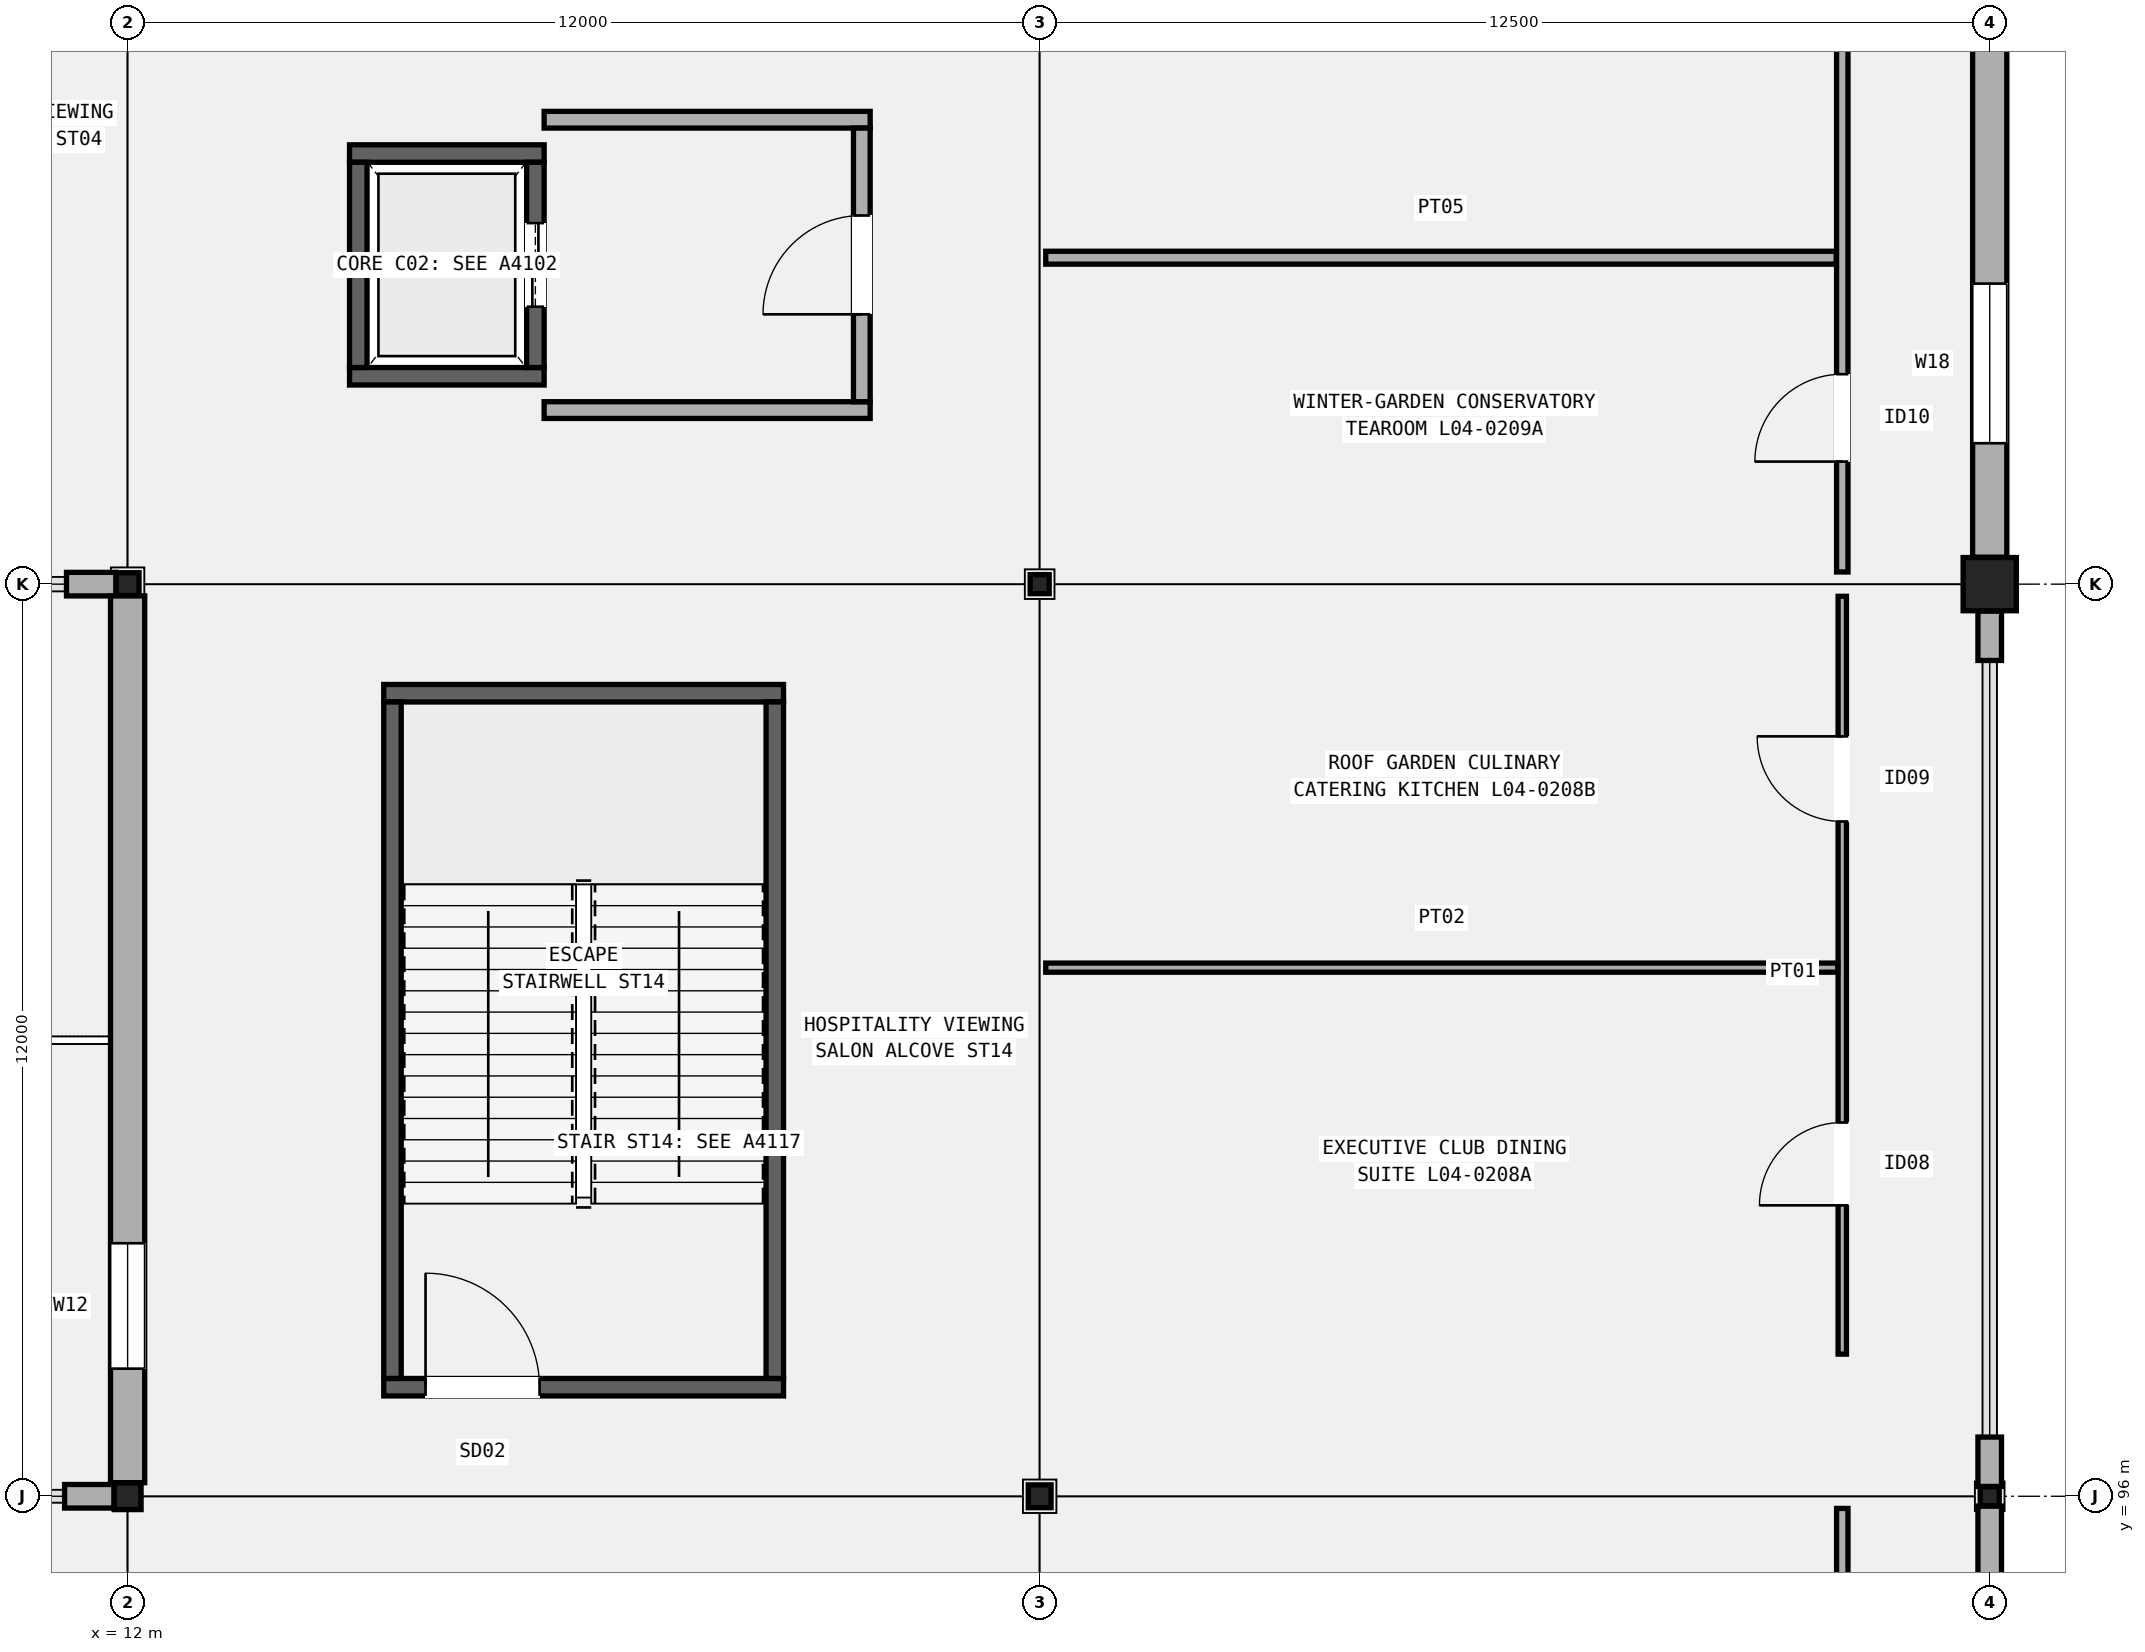
"""IFC4 building model, lengths in metres.
Left out: names, types, materials, properties, quantities, classifications, styles, units other than length and angle.
Written with IfcOpenShell. Run it as: python <this file> out.ifc"""

import sys

from ifc_helpers import new_model, si_unit, direction, frame, frame_2d, origin, origin_2d, place, context, subcontext, project, spatial, rectangle, hollow_rectangle, extrude, element, fill, save


model = new_model("IFC4")
c1 = context("Model", 3, precision=1e-05, world=origin(), true_north=direction((0.0, 1.0)))
c2 = subcontext(c1, "Body", "Model", "MODEL_VIEW")
j1 = project(units=[si_unit("LENGTHUNIT", "METRE"), si_unit("PLANEANGLEUNIT", "RADIAN")], contexts=[c1])
p1 = place(None, origin())
s1 = spatial("IfcSite", under=j1, at=p1, CompositionType="ELEMENT")
p2 = place(p1, origin())
s2 = spatial("IfcBuilding", under=s1, at=p2, CompositionType="ELEMENT")
p3 = place(p2, frame((0.0, 0.0, 20.4)))
s3 = spatial("IfcBuildingStorey", under=s2, at=p3, CompositionType="ELEMENT", Elevation=20.4)
p4 = place(p3, frame((12.0, 96.0, 0.0), z_axis=(0.0, 0.0, 1.0), x_axis=(1.0, 0.0, 0.0)))
e1 = element("IfcColumn", 1, at=p4, inside=s3, PredefinedType="COLUMN", context=c2, shape_type="SweptSolid", body=[
    extrude(hollow_rectangle(XDim=0.35, YDim=0.35, WallThickness=0.016, InnerFilletRadius=0.016, OuterFilletRadius=0.032, at=origin_2d()), origin(), (0.0, 0.0, 1.0), 5.4),
])
for number, where, z_axis, x_axis in (
    (2, (12.0, 108.0, 0.0), (0.0, 0.0, 1.0), (1.0, 0.0, 0.0)),
    (3, (24.0, 96.0, 0.0), (0.0, 0.0, 1.0), (1.0, 0.0, 0.0)),
):
    element("IfcColumn", number, at=place(p3, frame(where, z_axis=z_axis, x_axis=x_axis)), inside=s3, PredefinedType="COLUMN", context=c2, shape_type="SweptSolid", body=[
        extrude(hollow_rectangle(XDim=0.3, YDim=0.3, WallThickness=0.012, InnerFilletRadius=0.012, OuterFilletRadius=0.024, at=origin_2d()), origin(), (0.0, 0.0, 1.0), 5.4),
    ])
for number, where, z_axis, x_axis in (
    (4, (24.0, 108.0, 0.0), (0.0, 0.0, 1.0), (1.0, 0.0, 0.0)),
    (5, (36.5, 96.0, 0.0), (0.0, 0.0, 1.0), (1.0, 0.0, 0.0)),
):
    element("IfcColumn", number, at=place(p3, frame(where, z_axis=z_axis, x_axis=x_axis)), inside=s3, PredefinedType="COLUMN", context=c2, shape_type="SweptSolid", body=[
        extrude(hollow_rectangle(XDim=0.25, YDim=0.25, WallThickness=0.012, InnerFilletRadius=0.012, OuterFilletRadius=0.024, at=origin_2d()), origin(), (0.0, 0.0, 1.0), 5.4),
    ])
p5 = place(p3, frame((36.5, 108.0, 0.0), z_axis=(0.0, 0.0, 1.0), x_axis=(1.0, 0.0, 0.0)))
e6 = element("IfcColumn", 6, at=p5, inside=s3, PredefinedType="COLUMN", context=c2, shape_type="SweptSolid", body=[
    extrude(rectangle(XDim=0.7, YDim=0.7, at=origin_2d()), origin(), (0.0, 0.0, 1.0), 5.4),
])
p6 = place(p3, frame((11.171, 96.0, 0.0), z_axis=(0.0, 0.0, 1.0), x_axis=(1.0, 0.0, 0.0)))
e7 = element("IfcWall", 7, at=p6, inside=s3, PredefinedType="SOLIDWALL", context=c2, shape_type="SweptSolid", body=[
    extrude(rectangle(XDim=0.65, YDim=0.31, at=frame_2d((0.325, 0.0))), origin(), (0.0, 0.0, 1.0), 4.592),
])
p7 = place(p3, frame((11.196, 108.0, 0.0), z_axis=(0.0, 0.0, 1.0), x_axis=(1.0, 0.0, 0.0)))
e8 = element("IfcWall", 8, at=p7, inside=s3, PredefinedType="SOLIDWALL", context=c2, shape_type="SweptSolid", body=[
    extrude(rectangle(XDim=0.65, YDim=0.31, at=frame_2d((0.325, 0.0))), origin(), (0.0, 0.0, 1.0), 4.48),
])
p8 = place(p3, frame((12.0, 96.179, 0.0), z_axis=(0.0, 0.0, 1.0), x_axis=(0.0, 1.0, 0.0)))
e9 = element("IfcWall", 9, at=p8, inside=s3, PredefinedType="SOLIDWALL", context=c2, shape_type="SweptSolid", body=[
    extrude(rectangle(XDim=11.667, YDim=0.45, at=frame_2d((5.833, 0.0))), origin(), (0.0, 0.0, 1.0), 4.48),
])
p9 = place(p8, frame((1.5, 0.0, 0.95)))
e10 = element("IfcOpeningElement", 10, at=p9, cuts=e9, PredefinedType="OPENING", context=c2, shape_type="SweptSolid", body=[
    extrude(rectangle(XDim=1.65, YDim=2.45, at=frame_2d((0.825, 1.225))), frame((0.0, 0.235, 0.0), z_axis=(0.0, -1.0, 0.0), x_axis=(1.0, 0.0, 0.0)), (0.0, 0.0, 1.0), 0.47),
])
p10 = place(p3, frame((36.5, 84.154, 0.0), z_axis=(0.0, 0.0, 1.0), x_axis=(0.0, 1.0, 0.0)))
e11 = element("IfcWall", 11, at=p10, inside=s3, PredefinedType="SOLIDWALL", context=c2, shape_type="SweptSolid", body=[
    extrude(rectangle(XDim=11.717, YDim=0.31, at=frame_2d((5.858, 0.0))), origin(), (0.0, 0.0, 1.0), 4.58),
])
p11 = place(p10, frame((1.5, 0.0, 0.95)))
e12 = element("IfcOpeningElement", 12, at=p11, cuts=e11, PredefinedType="OPENING", context=c2, shape_type="SweptSolid", body=[
    extrude(rectangle(XDim=1.95, YDim=2.35, at=frame_2d((0.975, 1.175))), frame((0.0, 0.165, 0.0), z_axis=(0.0, -1.0, 0.0), x_axis=(1.0, 0.0, 0.0)), (0.0, 0.0, 1.0), 0.33),
])
p12 = place(p3, frame((36.5, 96.129, 0.0), z_axis=(0.0, 0.0, 1.0), x_axis=(0.0, 1.0, 0.0)))
e13 = element("IfcWall", 13, at=p12, inside=s3, PredefinedType="SOLIDWALL", context=c2, shape_type="SweptSolid", body=[
    extrude(rectangle(XDim=0.65, YDim=0.31, at=frame_2d((0.325, 0.0))), origin(), (0.0, 0.0, 1.0), 4.592),
])
p13 = place(p3, frame((36.5, 106.996, 0.0), z_axis=(0.0, 0.0, 1.0), x_axis=(0.0, 1.0, 0.0)))
e14 = element("IfcWall", 14, at=p13, inside=s3, PredefinedType="SOLIDWALL", context=c2, shape_type="SweptSolid", body=[
    extrude(rectangle(XDim=0.65, YDim=0.31, at=frame_2d((0.325, 0.0))), origin(), (0.0, 0.0, 1.0), 4.592),
])
p14 = place(p3, frame((36.5, 108.354, 0.0), z_axis=(0.0, 0.0, 1.0), x_axis=(0.0, 1.0, 0.0)))
e15 = element("IfcWall", 15, at=p14, inside=s3, PredefinedType="SOLIDWALL", context=c2, shape_type="SweptSolid", body=[
    extrude(rectangle(XDim=11.342, YDim=0.45, at=frame_2d((5.671, 0.0))), origin(), (0.0, 0.0, 1.0), 4.48),
])
p15 = place(p14, frame((1.5, 0.0, 0.95)))
e16 = element("IfcOpeningElement", 16, at=p15, cuts=e15, PredefinedType="OPENING", context=c2, shape_type="SweptSolid", body=[
    extrude(rectangle(XDim=2.1, YDim=1.85, at=frame_2d((1.05, 0.925))), frame((0.0, 0.235, 0.0), z_axis=(0.0, -1.0, 0.0), x_axis=(1.0, 0.0, 0.0)), (0.0, 0.0, 1.0), 0.47),
])
p16 = place(p3, frame((15.37, 97.435, 0.0), z_axis=(0.0, 0.0, 1.0), x_axis=(1.0, 0.0, 0.0)))
e17 = element("IfcWall", 17, at=p16, inside=s3, PredefinedType="SHEAR", context=c2, shape_type="SweptSolid", body=[
    extrude(rectangle(XDim=5.26, YDim=0.23, at=frame_2d((2.63, 0.0))), origin(), (0.0, 0.0, 1.0), 5.18),
])
p17 = place(p16, frame((0.55, 0.0, 0.0)))
e18 = element("IfcOpeningElement", 18, at=p17, cuts=e17, PredefinedType="OPENING", context=c2, shape_type="SweptSolid", body=[
    extrude(rectangle(XDim=1.5, YDim=2.2, at=frame_2d((0.75, 1.1))), frame((0.0, 0.125, 0.0), z_axis=(0.0, -1.0, 0.0), x_axis=(1.0, 0.0, 0.0)), (0.0, 0.0, 1.0), 0.25),
])
p18 = place(p3, frame((15.37, 106.565, 0.0), z_axis=(0.0, 0.0, 1.0), x_axis=(1.0, 0.0, 0.0)))
e19 = element("IfcWall", 19, at=p18, inside=s3, PredefinedType="SHEAR", context=c2, shape_type="SweptSolid", body=[
    extrude(rectangle(XDim=5.26, YDim=0.23, at=frame_2d((2.63, 0.0))), origin(), (0.0, 0.0, 1.0), 5.18),
])
for number, where, z_axis, x_axis in (
    (20, (15.485, 97.55, 0.0), (0.0, 0.0, 1.0), (0.0, 1.0, 0.0)),
    (21, (20.515, 97.55, 0.0), (0.0, 0.0, 1.0), (0.0, 1.0, 0.0)),
):
    element("IfcWall", number, at=place(p3, frame(where, z_axis=z_axis, x_axis=x_axis)), inside=s3, PredefinedType="SHEAR", context=c2, shape_type="SweptSolid", body=[
        extrude(rectangle(XDim=8.9, YDim=0.23, at=frame_2d((4.45, 0.0))), origin(), (0.0, 0.0, 1.0), 5.18),
    ])
for number, where, z_axis, x_axis in (
    (22, (14.92, 110.735, 0.0), (0.0, 0.0, 1.0), (1.0, 0.0, 0.0)),
    (23, (14.92, 113.665, 0.0), (0.0, 0.0, 1.0), (1.0, 0.0, 0.0)),
):
    element("IfcWall", number, at=place(p3, frame(where, z_axis=z_axis, x_axis=x_axis)), inside=s3, PredefinedType="SHEAR", context=c2, shape_type="SweptSolid", body=[
        extrude(rectangle(XDim=2.56, YDim=0.23, at=frame_2d((1.28, 0.0))), origin(), (0.0, 0.0, 1.0), 5.18),
    ])
p19 = place(p3, frame((15.035, 110.85, 0.0), z_axis=(0.0, 0.0, 1.0), x_axis=(0.0, 1.0, 0.0)))
e24 = element("IfcWall", 24, at=p19, inside=s3, PredefinedType="SHEAR", context=c2, shape_type="SweptSolid", body=[
    extrude(rectangle(XDim=2.7, YDim=0.23, at=frame_2d((1.35, 0.0))), origin(), (0.0, 0.0, 1.0), 5.18),
])
p20 = place(p3, frame((17.365, 110.85, 0.0), z_axis=(0.0, 0.0, 1.0), x_axis=(0.0, 1.0, 0.0)))
e25 = element("IfcWall", 25, at=p20, inside=s3, PredefinedType="SHEAR", context=c2, shape_type="SweptSolid", body=[
    extrude(rectangle(XDim=2.7, YDim=0.23, at=frame_2d((1.35, 0.0))), origin(), (0.0, 0.0, 1.0), 5.18),
])
p21 = place(p20, frame((0.8, 0.0, 0.0)))
e26 = element("IfcOpeningElement", 26, at=p21, cuts=e25, PredefinedType="OPENING", context=c2, shape_type="SweptSolid", body=[
    extrude(rectangle(XDim=1.1, YDim=2.15, at=frame_2d((0.55, 1.075))), frame((0.0, 0.125, 0.0), z_axis=(0.0, -1.0, 0.0), x_axis=(1.0, 0.0, 0.0)), (0.0, 0.0, 1.0), 0.25),
])
for number, where, z_axis, x_axis in (
    (27, (17.48, 110.29, 0.0), (0.0, 0.0, 1.0), (1.0, 0.0, 0.0)),
    (28, (17.48, 114.11, 0.0), (0.0, 0.0, 1.0), (1.0, 0.0, 0.0)),
):
    element("IfcWall", number, at=place(p3, frame(where, z_axis=z_axis, x_axis=x_axis)), inside=s3, PredefinedType="SOLIDWALL", context=c2, shape_type="SweptSolid", body=[
        extrude(rectangle(XDim=4.29, YDim=0.22, at=frame_2d((2.145, 0.0))), origin(), (0.0, 0.0, 1.0), 4.52),
    ])
p22 = place(p3, frame((21.66, 110.4, 0.0), z_axis=(0.0, 0.0, 1.0), x_axis=(0.0, 1.0, 0.0)))
e29 = element("IfcWall", 29, at=p22, inside=s3, PredefinedType="SOLIDWALL", context=c2, shape_type="SweptSolid", body=[
    extrude(rectangle(XDim=3.6, YDim=0.22, at=frame_2d((1.8, 0.0))), origin(), (0.0, 0.0, 1.0), 4.52),
])
p23 = place(p22, frame((1.15, 0.0, 0.0)))
e30 = element("IfcOpeningElement", 30, at=p23, cuts=e29, PredefinedType="OPENING", context=c2, shape_type="SweptSolid", body=[
    extrude(rectangle(XDim=1.3, YDim=2.15, at=frame_2d((0.65, 1.075))), frame((0.0, 0.12, 0.0), z_axis=(0.0, -1.0, 0.0), x_axis=(1.0, 0.0, 0.0)), (0.0, 0.0, 1.0), 0.24),
])
p24 = place(p3, frame((34.56, 84.16, 0.0), z_axis=(0.0, 0.0, 1.0), x_axis=(0.0, 1.0, 0.0)))
e31 = element("IfcWall", 31, at=p24, inside=s3, PredefinedType="PARTITIONING", context=c2, shape_type="SweptSolid", body=[
    extrude(rectangle(XDim=11.68, YDim=0.15, at=frame_2d((5.84, 0.0))), origin(), (0.0, 0.0, 1.0), 4.52),
])
p25 = place(p24, frame((5.31, 0.0, 0.0)))
e32 = element("IfcOpeningElement", 32, at=p25, cuts=e31, PredefinedType="OPENING", context=c2, shape_type="SweptSolid", body=[
    extrude(rectangle(XDim=1.06, YDim=2.15, at=frame_2d((0.53, 1.075))), frame((0.0, 0.085, 0.0), z_axis=(0.0, -1.0, 0.0), x_axis=(1.0, 0.0, 0.0)), (0.0, 0.0, 1.0), 0.17),
])
p26 = place(p3, frame((34.56, 97.87, 0.0), z_axis=(0.0, 0.0, 1.0), x_axis=(0.0, 1.0, 0.0)))
e33 = element("IfcWall", 33, at=p26, inside=s3, PredefinedType="PARTITIONING", context=c2, shape_type="SweptSolid", body=[
    extrude(rectangle(XDim=9.97, YDim=0.11, at=frame_2d((4.985, 0.0))), origin(), (0.0, 0.0, 1.0), 4.52),
])
p27 = place(p26, frame((1.958, 0.0, 0.0)))
e34 = element("IfcOpeningElement", 34, at=p27, cuts=e33, PredefinedType="OPENING", context=c2, shape_type="SweptSolid", body=[
    extrude(rectangle(XDim=1.09, YDim=2.16, at=frame_2d((0.545, 1.08))), frame((0.0, 0.065, 0.0), z_axis=(0.0, -1.0, 0.0), x_axis=(1.0, 0.0, 0.0)), (0.0, 0.0, 1.0), 0.13),
])
p28 = place(p26, frame((7.007, 0.0, 0.0)))
e35 = element("IfcOpeningElement", 35, at=p28, cuts=e33, PredefinedType="OPENING", context=c2, shape_type="SweptSolid", body=[
    extrude(rectangle(XDim=1.12, YDim=2.18, at=frame_2d((0.56, 1.09))), frame((0.0, 0.065, 0.0), z_axis=(0.0, -1.0, 0.0), x_axis=(1.0, 0.0, 0.0)), (0.0, 0.0, 1.0), 0.13),
])
p29 = place(p3, frame((24.08, 102.955, 0.0), z_axis=(0.0, 0.0, 1.0), x_axis=(1.0, 0.0, 0.0)))
e36 = element("IfcWall", 36, at=p29, inside=s3, PredefinedType="PARTITIONING", context=c2, shape_type="SweptSolid", body=[
    extrude(rectangle(XDim=10.42, YDim=0.12, at=frame_2d((5.21, 0.0))), origin(), (0.0, 0.0, 1.0), 4.52),
])
p30 = place(p3, frame((34.56, 108.16, 0.0), z_axis=(0.0, 0.0, 1.0), x_axis=(0.0, 1.0, 0.0)))
e37 = element("IfcWall", 37, at=p30, inside=s3, PredefinedType="PARTITIONING", context=c2, shape_type="SweptSolid", body=[
    extrude(rectangle(XDim=11.68, YDim=0.15, at=frame_2d((5.84, 0.0))), origin(), (0.0, 0.0, 1.0), 4.52),
])
p31 = place(p30, frame((1.452, 0.0, 0.0)))
e38 = element("IfcOpeningElement", 38, at=p31, cuts=e37, PredefinedType="OPENING", context=c2, shape_type="SweptSolid", body=[
    extrude(rectangle(XDim=1.15, YDim=2.15, at=frame_2d((0.575, 1.075))), frame((0.0, 0.085, 0.0), z_axis=(0.0, -1.0, 0.0), x_axis=(1.0, 0.0, 0.0)), (0.0, 0.0, 1.0), 0.17),
])
p32 = place(p30, frame((7.357, 0.0, 0.0)))
e39 = element("IfcOpeningElement", 39, at=p32, cuts=e37, PredefinedType="OPENING", context=c2, shape_type="SweptSolid", body=[
    extrude(rectangle(XDim=1.18, YDim=2.2, at=frame_2d((0.59, 1.1))), frame((0.0, 0.085, 0.0), z_axis=(0.0, -1.0, 0.0), x_axis=(1.0, 0.0, 0.0)), (0.0, 0.0, 1.0), 0.17),
])
p33 = place(p3, frame((24.08, 112.295, 0.0), z_axis=(0.0, 0.0, 1.0), x_axis=(1.0, 0.0, 0.0)))
e40 = element("IfcWall", 40, at=p33, inside=s3, PredefinedType="PARTITIONING", context=c2, shape_type="SweptSolid", body=[
    extrude(rectangle(XDim=10.4, YDim=0.17, at=frame_2d((5.2, 0.0))), origin(), (0.0, 0.0, 1.0), 4.52),
])
p34 = place(p9, origin())
e41 = element("IfcWindow", 41, at=p34, inside=s3, PartitioningType="SINGLE_PANEL", PredefinedType="WINDOW", context=c2, shape_type="SweptSolid", body=[
    extrude(rectangle(XDim=1.65, YDim=2.45, at=frame_2d((0.825, 1.225))), frame((0.0, 0.03, 0.0), z_axis=(0.0, -1.0, 0.0), x_axis=(1.0, 0.0, 0.0)), (0.0, 0.0, 1.0), 0.06),
])
fill(e10, e41)
p35 = place(p15, origin())
e42 = element("IfcWindow", 42, at=p35, inside=s3, PartitioningType="SINGLE_PANEL", PredefinedType="WINDOW", context=c2, shape_type="SweptSolid", body=[
    extrude(rectangle(XDim=2.1, YDim=1.85, at=frame_2d((1.05, 0.925))), frame((0.0, 0.03, 0.0), z_axis=(0.0, -1.0, 0.0), x_axis=(1.0, 0.0, 0.0)), (0.0, 0.0, 1.0), 0.06),
])
fill(e16, e42)
p36 = place(p17, origin())
e43 = element("IfcDoor", 43, at=p36, inside=s3, OperationType="SINGLE_SWING_LEFT", PredefinedType="DOOR", context=c2, shape_type="SweptSolid", body=[
    extrude(rectangle(XDim=1.5, YDim=2.2, at=frame_2d((0.75, 1.1))), frame((0.0, 0.025, 0.0), z_axis=(0.0, -1.0, 0.0), x_axis=(1.0, 0.0, 0.0)), (0.0, 0.0, 1.0), 0.05),
])
fill(e18, e43)
p37 = place(p21, origin())
e44 = element("IfcDoor", 44, at=p37, inside=s3, OperationType="DOUBLE_DOOR_SLIDING", PredefinedType="DOOR", context=c2, shape_type="SweptSolid", body=[
    extrude(rectangle(XDim=1.1, YDim=2.15, at=frame_2d((0.55, 1.075))), frame((0.0, 0.025, 0.0), z_axis=(0.0, -1.0, 0.0), x_axis=(1.0, 0.0, 0.0)), (0.0, 0.0, 1.0), 0.05),
])
fill(e26, e44)
p38 = place(p23, origin())
e45 = element("IfcDoor", 45, at=p38, inside=s3, OperationType="SINGLE_SWING_LEFT", PredefinedType="DOOR", context=c2, shape_type="SweptSolid", body=[
    extrude(rectangle(XDim=1.3, YDim=2.15, at=frame_2d((0.65, 1.075))), frame((0.0, 0.025, 0.0), z_axis=(0.0, -1.0, 0.0), x_axis=(1.0, 0.0, 0.0)), (0.0, 0.0, 1.0), 0.05),
])
fill(e30, e45)
p39 = place(p27, origin())
e46 = element("IfcDoor", 46, at=p39, inside=s3, OperationType="SINGLE_SWING_LEFT", PredefinedType="DOOR", context=c2, shape_type="SweptSolid", body=[
    extrude(rectangle(XDim=1.09, YDim=2.16, at=frame_2d((0.545, 1.08))), frame((0.0, 0.025, 0.0), z_axis=(0.0, -1.0, 0.0), x_axis=(1.0, 0.0, 0.0)), (0.0, 0.0, 1.0), 0.05),
])
fill(e34, e46)
p40 = place(p28, origin())
e47 = element("IfcDoor", 47, at=p40, inside=s3, OperationType="SINGLE_SWING_RIGHT", PredefinedType="DOOR", context=c2, shape_type="SweptSolid", body=[
    extrude(rectangle(XDim=1.12, YDim=2.18, at=frame_2d((0.56, 1.09))), frame((0.0, 0.025, 0.0), z_axis=(0.0, -1.0, 0.0), x_axis=(1.0, 0.0, 0.0)), (0.0, 0.0, 1.0), 0.05),
])
fill(e35, e47)
p41 = place(p31, origin())
e48 = element("IfcDoor", 48, at=p41, inside=s3, OperationType="SINGLE_SWING_LEFT", PredefinedType="DOOR", context=c2, shape_type="SweptSolid", body=[
    extrude(rectangle(XDim=1.15, YDim=2.15, at=frame_2d((0.575, 1.075))), frame((0.0, 0.025, 0.0), z_axis=(0.0, -1.0, 0.0), x_axis=(1.0, 0.0, 0.0)), (0.0, 0.0, 1.0), 0.05),
])
fill(e38, e48)
save(model, sys.argv[1])
